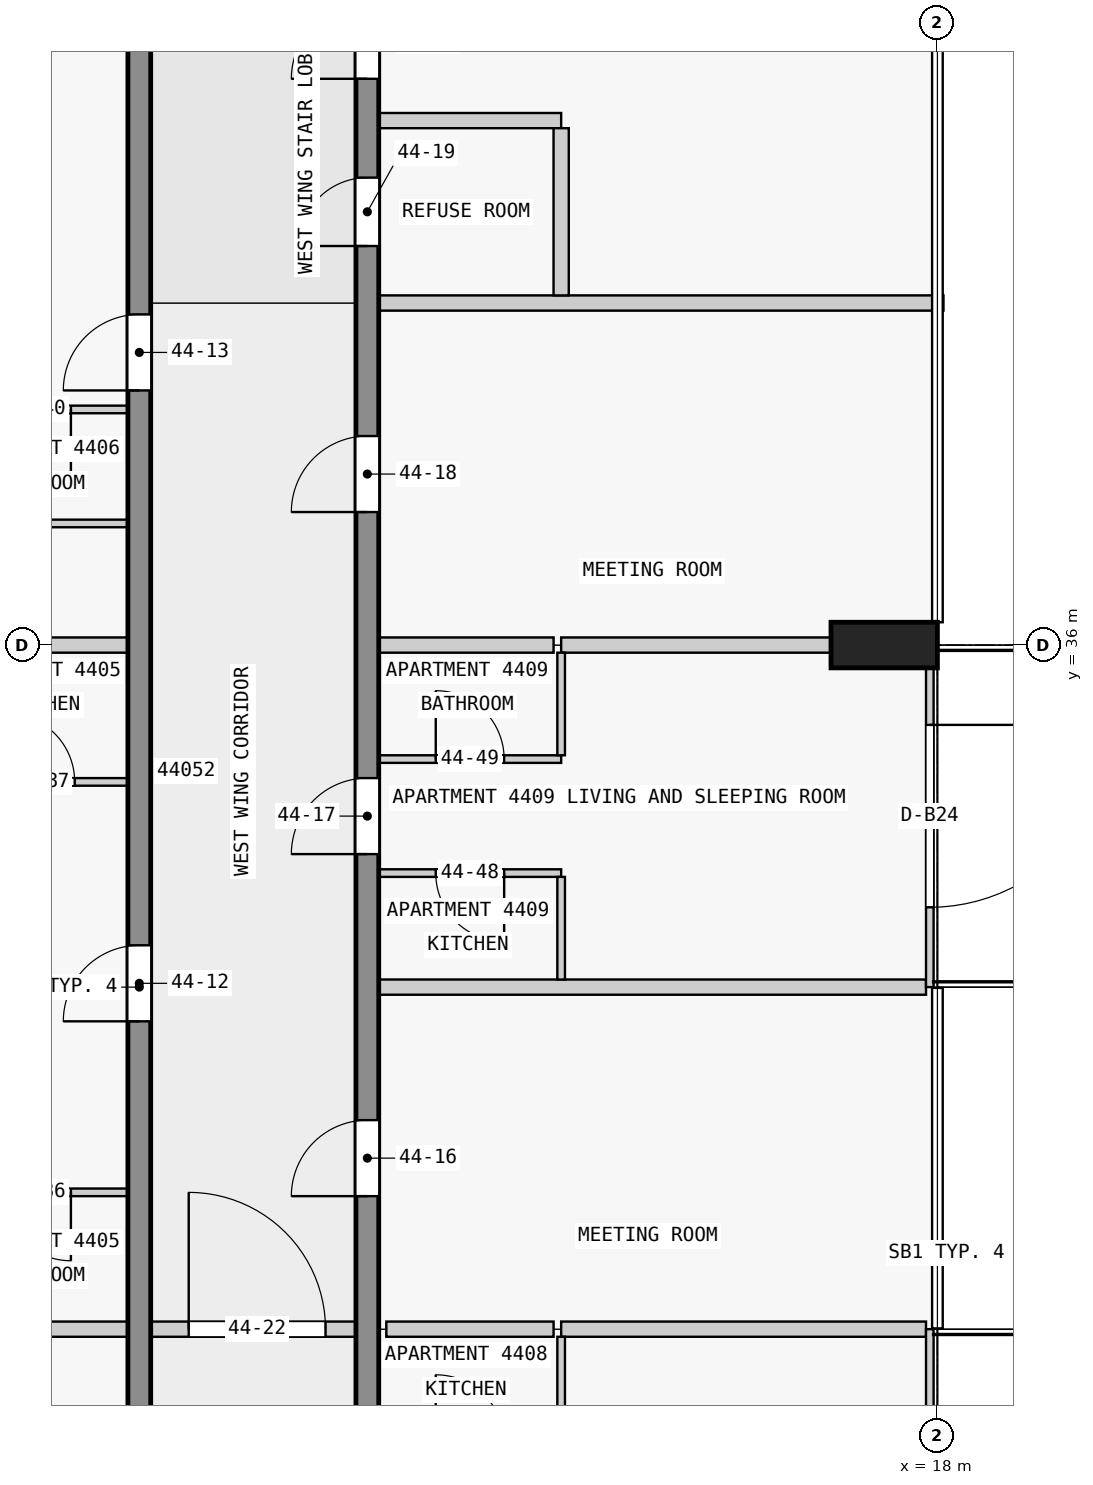
"""IFC4 building model, lengths in metres.
Left out: names, types, materials, properties, quantities, classifications, styles, units other than length and angle.
Written with IfcOpenShell. Run it as: python <this file> out.ifc"""

import sys

from ifc_helpers import new_model, si_unit, direction, frame, frame_2d, origin, origin_2d, place, context, subcontext, project, spatial, rectangle, extrude, element, fill, save


model = new_model("IFC4")
c1 = context("Model", 3, precision=1e-05, world=origin(), true_north=direction((0.0, 1.0)))
c2 = subcontext(c1, "Body", "Model", "MODEL_VIEW")
j1 = project(units=[si_unit("LENGTHUNIT", "METRE"), si_unit("PLANEANGLEUNIT", "RADIAN")], contexts=[c1])
p1 = place(None, origin())
s1 = spatial("IfcSite", under=j1, at=p1, CompositionType="ELEMENT")
p2 = place(p1, origin())
s2 = spatial("IfcBuilding", under=s1, at=p2, CompositionType="ELEMENT")
p3 = place(p2, frame((0.0, 0.0, 170.9)))
s3 = spatial("IfcBuildingStorey", under=s2, at=p3, CompositionType="ELEMENT", Elevation=170.9)
p4 = place(p3, frame((17.3, 36.0, 0.0), z_axis=(0.0, 0.0, 1.0), x_axis=(0.0, 1.0, 0.0)))
e1 = element("IfcColumn", 1, at=p4, inside=s3, PredefinedType="COLUMN", context=c2, shape_type="SweptSolid", body=[
    extrude(rectangle(XDim=0.6, YDim=1.4, at=origin_2d()), origin(), (0.0, 0.0, 1.0), 3.5),
])
p5 = place(p3, frame((7.5, 18.0, 0.0), z_axis=(0.0, 0.0, 1.0), x_axis=(0.0, 1.0, 0.0)))
e2 = element("IfcWall", 2, at=p5, inside=s3, PredefinedType="SHEAR", context=c2, shape_type="SweptSolid", body=[
    extrude(rectangle(XDim=27.0, YDim=0.3, at=frame_2d((13.5, 0.0))), origin(), (0.0, 0.0, 1.0), 3.25),
])
p6 = place(p5, frame((1.75, 0.0, 0.0)))
e3 = element("IfcOpeningElement", 3, at=p6, cuts=e2, PredefinedType="OPENING", context=c2, shape_type="SweptSolid", body=[
    extrude(rectangle(XDim=1.0, YDim=2.1, at=frame_2d((0.5, 1.05))), frame((0.0, 0.16, 0.0), z_axis=(0.0, -1.0, 0.0), x_axis=(1.0, 0.0, 0.0)), (0.0, 0.0, 1.0), 0.32),
])
p7 = place(p5, frame((5.85, 0.0, 0.0)))
e4 = element("IfcOpeningElement", 4, at=p7, cuts=e2, PredefinedType="OPENING", context=c2, shape_type="SweptSolid", body=[
    extrude(rectangle(XDim=1.8, YDim=2.1, at=frame_2d((0.9, 1.05))), frame((0.0, 0.16, 0.0), z_axis=(0.0, -1.0, 0.0), x_axis=(1.0, 0.0, 0.0)), (0.0, 0.0, 1.0), 0.32),
])
p8 = place(p5, frame((13.05, 0.0, 0.0)))
e5 = element("IfcOpeningElement", 5, at=p8, cuts=e2, PredefinedType="OPENING", context=c2, shape_type="SweptSolid", body=[
    extrude(rectangle(XDim=1.0, YDim=2.1, at=frame_2d((0.5, 1.05))), frame((0.0, 0.16, 0.0), z_axis=(0.0, -1.0, 0.0), x_axis=(1.0, 0.0, 0.0)), (0.0, 0.0, 1.0), 0.32),
])
p9 = place(p5, frame((21.35, 0.0, 0.0)))
e6 = element("IfcOpeningElement", 6, at=p9, cuts=e2, PredefinedType="OPENING", context=c2, shape_type="SweptSolid", body=[
    extrude(rectangle(XDim=1.0, YDim=2.1, at=frame_2d((0.5, 1.05))), frame((0.0, 0.16, 0.0), z_axis=(0.0, -1.0, 0.0), x_axis=(1.0, 0.0, 0.0)), (0.0, 0.0, 1.0), 0.32),
])
p10 = place(p3, frame((10.5, 18.0, 0.0), z_axis=(0.0, 0.0, 1.0), x_axis=(0.0, 1.0, 0.0)))
e7 = element("IfcWall", 7, at=p10, inside=s3, PredefinedType="SHEAR", context=c2, shape_type="SweptSolid", body=[
    extrude(rectangle(XDim=27.0, YDim=0.3, at=frame_2d((13.5, 0.0))), origin(), (0.0, 0.0, 1.0), 3.25),
])
p11 = place(p10, frame((1.75, 0.0, 0.0)))
e8 = element("IfcOpeningElement", 8, at=p11, cuts=e7, PredefinedType="OPENING", context=c2, shape_type="SweptSolid", body=[
    extrude(rectangle(XDim=1.0, YDim=2.1, at=frame_2d((0.5, 1.05))), frame((0.0, 0.16, 0.0), z_axis=(0.0, -1.0, 0.0), x_axis=(1.0, 0.0, 0.0)), (0.0, 0.0, 1.0), 0.32),
])
p12 = place(p10, frame((6.25, 0.0, 0.0)))
e9 = element("IfcOpeningElement", 9, at=p12, cuts=e7, PredefinedType="OPENING", context=c2, shape_type="SweptSolid", body=[
    extrude(rectangle(XDim=1.0, YDim=2.1, at=frame_2d((0.5, 1.05))), frame((0.0, 0.16, 0.0), z_axis=(0.0, -1.0, 0.0), x_axis=(1.0, 0.0, 0.0)), (0.0, 0.0, 1.0), 0.32),
])
p13 = place(p10, frame((10.75, 0.0, 0.0)))
e10 = element("IfcOpeningElement", 10, at=p13, cuts=e7, PredefinedType="OPENING", context=c2, shape_type="SweptSolid", body=[
    extrude(rectangle(XDim=1.0, YDim=2.1, at=frame_2d((0.5, 1.05))), frame((0.0, 0.16, 0.0), z_axis=(0.0, -1.0, 0.0), x_axis=(1.0, 0.0, 0.0)), (0.0, 0.0, 1.0), 0.32),
])
p14 = place(p10, frame((15.25, 0.0, 0.0)))
e11 = element("IfcOpeningElement", 11, at=p14, cuts=e7, PredefinedType="OPENING", context=c2, shape_type="SweptSolid", body=[
    extrude(rectangle(XDim=1.0, YDim=2.1, at=frame_2d((0.5, 1.05))), frame((0.0, 0.16, 0.0), z_axis=(0.0, -1.0, 0.0), x_axis=(1.0, 0.0, 0.0)), (0.0, 0.0, 1.0), 0.32),
])
p15 = place(p10, frame((19.75, 0.0, 0.0)))
e12 = element("IfcOpeningElement", 12, at=p15, cuts=e7, PredefinedType="OPENING", context=c2, shape_type="SweptSolid", body=[
    extrude(rectangle(XDim=1.0, YDim=2.1, at=frame_2d((0.5, 1.05))), frame((0.0, 0.16, 0.0), z_axis=(0.0, -1.0, 0.0), x_axis=(1.0, 0.0, 0.0)), (0.0, 0.0, 1.0), 0.32),
])
p16 = place(p10, frame((23.25, 0.0, 0.0)))
e13 = element("IfcOpeningElement", 13, at=p16, cuts=e7, PredefinedType="OPENING", context=c2, shape_type="SweptSolid", body=[
    extrude(rectangle(XDim=0.9, YDim=2.1, at=frame_2d((0.45, 1.05))), frame((0.0, 0.16, 0.0), z_axis=(0.0, -1.0, 0.0), x_axis=(1.0, 0.0, 0.0)), (0.0, 0.0, 1.0), 0.32),
])
p17 = place(p10, frame((25.45, 0.0, 0.0)))
e14 = element("IfcOpeningElement", 14, at=p17, cuts=e7, PredefinedType="OPENING", context=c2, shape_type="SweptSolid", body=[
    extrude(rectangle(XDim=1.0, YDim=2.1, at=frame_2d((0.5, 1.05))), frame((0.0, 0.16, 0.0), z_axis=(0.0, -1.0, 0.0), x_axis=(1.0, 0.0, 0.0)), (0.0, 0.0, 1.0), 0.32),
])
p18 = place(p3, frame((17.9, 27.0, 0.0), z_axis=(0.0, 0.0, 1.0), x_axis=(0.0, -1.0, 0.0)))
e15 = element("IfcWall", 15, at=p18, inside=s3, PredefinedType="STANDARD", context=c2, shape_type="SweptSolid", body=[
    extrude(rectangle(XDim=4.5, YDim=0.1, at=frame_2d((2.25, 0.0))), origin(), (0.0, 0.0, 1.0), 3.25),
])
p19 = place(p18, frame((1.05, 0.0, 0.0)))
e16 = element("IfcOpeningElement", 16, at=p19, cuts=e15, PredefinedType="OPENING", context=c2, shape_type="SweptSolid", body=[
    extrude(rectangle(XDim=2.4, YDim=2.4, at=frame_2d((1.2, 1.2))), frame((0.0, 0.06, 0.0), z_axis=(0.0, -1.0, 0.0), x_axis=(1.0, 0.0, 0.0)), (0.0, 0.0, 1.0), 0.12),
])
p20 = place(p3, frame((17.9, 36.0, 0.0), z_axis=(0.0, 0.0, 1.0), x_axis=(0.0, -1.0, 0.0)))
e17 = element("IfcWall", 17, at=p20, inside=s3, PredefinedType="STANDARD", context=c2, shape_type="SweptSolid", body=[
    extrude(rectangle(XDim=4.5, YDim=0.1, at=frame_2d((2.25, 0.0))), origin(), (0.0, 0.0, 1.0), 3.25),
])
p21 = place(p20, frame((1.05, 0.0, 0.0)))
e18 = element("IfcOpeningElement", 18, at=p21, cuts=e17, PredefinedType="OPENING", context=c2, shape_type="SweptSolid", body=[
    extrude(rectangle(XDim=2.4, YDim=2.4, at=frame_2d((1.2, 1.2))), frame((0.0, 0.06, 0.0), z_axis=(0.0, -1.0, 0.0), x_axis=(1.0, 0.0, 0.0)), (0.0, 0.0, 1.0), 0.12),
])
p22 = place(p3, frame((7.35, 27.0, 0.0), z_axis=(0.0, 0.0, 1.0), x_axis=(-1.0, 0.0, 0.0)))
e19 = element("IfcWall", 19, at=p22, inside=s3, PredefinedType="PARTITIONING", context=c2, shape_type="SweptSolid", body=[
    extrude(rectangle(XDim=7.43, YDim=0.2, at=frame_2d((3.715, 0.0))), origin(), (0.0, 0.0, 1.0), 3.25),
])
p23 = place(p3, frame((12.95, 27.0, 0.0), z_axis=(0.0, 0.0, 1.0), x_axis=(-1.0, 0.0, 0.0)))
e20 = element("IfcWall", 20, at=p23, inside=s3, PredefinedType="PARTITIONING", context=c2, shape_type="SweptSolid", body=[
    extrude(rectangle(XDim=2.2, YDim=0.2, at=frame_2d((1.1, 0.0))), origin(), (0.0, 0.0, 1.0), 3.25),
])
p24 = place(p3, frame((13.05, 27.0, 0.0), z_axis=(0.0, 0.0, 1.0), x_axis=(1.0, 0.0, 0.0)))
e21 = element("IfcWall", 21, at=p24, inside=s3, PredefinedType="PARTITIONING", context=c2, shape_type="SweptSolid", body=[
    extrude(rectangle(XDim=4.8, YDim=0.2, at=frame_2d((2.4, 0.0))), origin(), (0.0, 0.0, 1.0), 3.25),
])
p25 = place(p3, frame((7.35, 28.8, 0.0), z_axis=(0.0, 0.0, 1.0), x_axis=(-1.0, 0.0, 0.0)))
e22 = element("IfcWall", 22, at=p25, inside=s3, PredefinedType="PARTITIONING", context=c2, shape_type="SweptSolid", body=[
    extrude(rectangle(XDim=2.35, YDim=0.1, at=frame_2d((1.175, 0.0))), origin(), (0.0, 0.0, 1.0), 3.25),
])
p26 = place(p25, frame((0.75, 0.0, 0.0)))
e23 = element("IfcOpeningElement", 23, at=p26, cuts=e22, PredefinedType="OPENING", context=c2, shape_type="SweptSolid", body=[
    extrude(rectangle(XDim=0.9, YDim=2.1, at=frame_2d((0.45, 1.05))), frame((0.0, 0.06, 0.0), z_axis=(0.0, -1.0, 0.0), x_axis=(1.0, 0.0, 0.0)), (0.0, 0.0, 1.0), 0.12),
])
p27 = place(p3, frame((17.85, 31.5, 0.0), z_axis=(0.0, 0.0, 1.0), x_axis=(-1.0, 0.0, 0.0)))
e24 = element("IfcWall", 24, at=p27, inside=s3, PredefinedType="PARTITIONING", context=c2, shape_type="SweptSolid", body=[
    extrude(rectangle(XDim=7.2, YDim=0.2, at=frame_2d((3.6, 0.0))), origin(), (0.0, 0.0, 1.0), 3.25),
])
p28 = place(p3, frame((13.05, 33.0, 0.0), z_axis=(0.0, 0.0, 1.0), x_axis=(-1.0, 0.0, 0.0)))
e25 = element("IfcWall", 25, at=p28, inside=s3, PredefinedType="PARTITIONING", context=c2, shape_type="SweptSolid", body=[
    extrude(rectangle(XDim=2.4, YDim=0.1, at=frame_2d((1.2, 0.0))), origin(), (0.0, 0.0, 1.0), 3.25),
])
p29 = place(p28, frame((0.75, 0.0, 0.0)))
e26 = element("IfcOpeningElement", 26, at=p29, cuts=e25, PredefinedType="OPENING", context=c2, shape_type="SweptSolid", body=[
    extrude(rectangle(XDim=0.9, YDim=2.1, at=frame_2d((0.45, 1.05))), frame((0.0, 0.06, 0.0), z_axis=(0.0, -1.0, 0.0), x_axis=(1.0, 0.0, 0.0)), (0.0, 0.0, 1.0), 0.12),
])
p30 = place(p3, frame((5.0, 34.2, 0.0), z_axis=(0.0, 0.0, 1.0), x_axis=(1.0, 0.0, 0.0)))
e27 = element("IfcWall", 27, at=p30, inside=s3, PredefinedType="PARTITIONING", context=c2, shape_type="SweptSolid", body=[
    extrude(rectangle(XDim=2.35, YDim=0.1, at=frame_2d((1.175, 0.0))), origin(), (0.0, 0.0, 1.0), 3.25),
])
p31 = place(p30, frame((0.75, 0.0, 0.0)))
e28 = element("IfcOpeningElement", 28, at=p31, cuts=e27, PredefinedType="OPENING", context=c2, shape_type="SweptSolid", body=[
    extrude(rectangle(XDim=0.9, YDim=2.1, at=frame_2d((0.45, 1.05))), frame((0.0, 0.06, 0.0), z_axis=(0.0, -1.0, 0.0), x_axis=(1.0, 0.0, 0.0)), (0.0, 0.0, 1.0), 0.12),
])
p32 = place(p3, frame((10.65, 34.5, 0.0), z_axis=(0.0, 0.0, 1.0), x_axis=(1.0, 0.0, 0.0)))
e29 = element("IfcWall", 29, at=p32, inside=s3, PredefinedType="PARTITIONING", context=c2, shape_type="SweptSolid", body=[
    extrude(rectangle(XDim=2.4, YDim=0.1, at=frame_2d((1.2, 0.0))), origin(), (0.0, 0.0, 1.0), 3.25),
])
p33 = place(p32, frame((0.75, 0.0, 0.0)))
e30 = element("IfcOpeningElement", 30, at=p33, cuts=e29, PredefinedType="OPENING", context=c2, shape_type="SweptSolid", body=[
    extrude(rectangle(XDim=0.9, YDim=2.1, at=frame_2d((0.45, 1.05))), frame((0.0, 0.06, 0.0), z_axis=(0.0, -1.0, 0.0), x_axis=(1.0, 0.0, 0.0)), (0.0, 0.0, 1.0), 0.12),
])
for number, where, z_axis, x_axis in (
    (31, (7.35, 36.0, 0.0), (0.0, 0.0, 1.0), (-1.0, 0.0, 0.0)),
    (32, (12.95, 36.0, 0.0), (0.0, 0.0, 1.0), (-1.0, 0.0, 0.0)),
):
    element("IfcWall", number, at=place(p3, frame(where, z_axis=z_axis, x_axis=x_axis)), inside=s3, PredefinedType="PARTITIONING", context=c2, shape_type="SweptSolid", body=[
        extrude(rectangle(XDim=2.3, YDim=0.2, at=frame_2d((1.15, 0.0))), origin(), (0.0, 0.0, 1.0), 3.25),
    ])
p34 = place(p3, frame((13.05, 36.0, 0.0), z_axis=(0.0, 0.0, 1.0), x_axis=(1.0, 0.0, 0.0)))
e33 = element("IfcWall", 33, at=p34, inside=s3, PredefinedType="PARTITIONING", context=c2, shape_type="SweptSolid", body=[
    extrude(rectangle(XDim=3.55, YDim=0.2, at=frame_2d((1.775, 0.0))), origin(), (0.0, 0.0, 1.0), 3.25),
])
p35 = place(p3, frame((7.35, 37.6, 0.0), z_axis=(0.0, 0.0, 1.0), x_axis=(-1.0, 0.0, 0.0)))
e34 = element("IfcWall", 34, at=p35, inside=s3, PredefinedType="PARTITIONING", context=c2, shape_type="SweptSolid", body=[
    extrude(rectangle(XDim=2.35, YDim=0.1, at=frame_2d((1.175, 0.0))), origin(), (0.0, 0.0, 1.0), 3.25),
])
p36 = place(p3, frame((7.35, 39.1, 0.0), z_axis=(0.0, 0.0, 1.0), x_axis=(-1.0, 0.0, 0.0)))
e35 = element("IfcWall", 35, at=p36, inside=s3, PredefinedType="PARTITIONING", context=c2, shape_type="SweptSolid", body=[
    extrude(rectangle(XDim=2.35, YDim=0.1, at=frame_2d((1.175, 0.0))), origin(), (0.0, 0.0, 1.0), 3.25),
])
p37 = place(p36, frame((0.75, 0.0, 0.0)))
e36 = element("IfcOpeningElement", 36, at=p37, cuts=e35, PredefinedType="OPENING", context=c2, shape_type="SweptSolid", body=[
    extrude(rectangle(XDim=0.9, YDim=2.1, at=frame_2d((0.45, 1.05))), frame((0.0, 0.06, 0.0), z_axis=(0.0, -1.0, 0.0), x_axis=(1.0, 0.0, 0.0)), (0.0, 0.0, 1.0), 0.12),
])
p38 = place(p3, frame((18.08, 40.5, 0.0), z_axis=(0.0, 0.0, 1.0), x_axis=(-1.0, 0.0, 0.0)))
e37 = element("IfcWall", 37, at=p38, inside=s3, PredefinedType="PARTITIONING", context=c2, shape_type="SweptSolid", body=[
    extrude(rectangle(XDim=7.43, YDim=0.2, at=frame_2d((3.715, 0.0))), origin(), (0.0, 0.0, 1.0), 3.25),
])
p39 = place(p3, frame((13.05, 42.9, 0.0), z_axis=(0.0, 0.0, 1.0), x_axis=(-1.0, 0.0, 0.0)))
e38 = element("IfcWall", 38, at=p39, inside=s3, PredefinedType="PARTITIONING", context=c2, shape_type="SweptSolid", body=[
    extrude(rectangle(XDim=2.4, YDim=0.2, at=frame_2d((1.2, 0.0))), origin(), (0.0, 0.0, 1.0), 3.25),
])
for number, where, z_axis, x_axis in (
    (39, (13.05, 25.55, 0.0), (0.0, 0.0, 1.0), (0.0, 1.0, 0.0)),
    (40, (13.05, 31.6, 0.0), (0.0, 0.0, 1.0), (0.0, 1.0, 0.0)),
    (41, (13.05, 34.55, 0.0), (0.0, 0.0, 1.0), (0.0, 1.0, 0.0)),
):
    element("IfcWall", number, at=place(p3, frame(where, z_axis=z_axis, x_axis=x_axis)), inside=s3, PredefinedType="PARTITIONING", context=c2, shape_type="SweptSolid", body=[
        extrude(rectangle(XDim=1.35, YDim=0.1, at=frame_2d((0.675, 0.0))), origin(), (0.0, 0.0, 1.0), 3.25),
    ])
p40 = place(p3, frame((13.05, 40.6, 0.0), z_axis=(0.0, 0.0, 1.0), x_axis=(0.0, 1.0, 0.0)))
e42 = element("IfcWall", 42, at=p40, inside=s3, PredefinedType="PARTITIONING", context=c2, shape_type="SweptSolid", body=[
    extrude(rectangle(XDim=2.2, YDim=0.2, at=frame_2d((1.1, 0.0))), origin(), (0.0, 0.0, 1.0), 3.25),
])
p41 = place(p3, frame((7.45, 27.0, 0.0), z_axis=(0.0, 0.0, 1.0), x_axis=(1.0, 0.0, 0.0)))
e43 = element("IfcWall", 43, at=p41, inside=s3, PredefinedType="PARTITIONING", context=c2, shape_type="SweptSolid", body=[
    extrude(rectangle(XDim=3.2, YDim=0.2, at=frame_2d((1.6, 0.0))), origin(), (0.0, 0.0, 1.0), 3.25),
])
p42 = place(p41, frame((0.7, 0.0, 0.0)))
e44 = element("IfcOpeningElement", 44, at=p42, cuts=e43, PredefinedType="OPENING", context=c2, shape_type="SweptSolid", body=[
    extrude(rectangle(XDim=1.8, YDim=2.1, at=frame_2d((0.9, 1.05))), frame((0.0, 0.11, 0.0), z_axis=(0.0, -1.0, 0.0), x_axis=(1.0, 0.0, 0.0)), (0.0, 0.0, 1.0), 0.22),
])
p43 = place(p21, origin())
e45 = element("IfcDoor", 45, at=p43, inside=s3, OperationType="SINGLE_SWING_LEFT", PredefinedType="DOOR", context=c2, shape_type="SweptSolid", body=[
    extrude(rectangle(XDim=2.4, YDim=2.4, at=frame_2d((1.2, 1.2))), frame((0.0, 0.025, 0.0), z_axis=(0.0, -1.0, 0.0), x_axis=(1.0, 0.0, 0.0)), (0.0, 0.0, 1.0), 0.05),
])
fill(e18, e45)
p44 = place(p8, origin())
e46 = element("IfcDoor", 46, at=p44, inside=s3, OperationType="SINGLE_SWING_RIGHT", PredefinedType="DOOR", context=c2, shape_type="SweptSolid", body=[
    extrude(rectangle(XDim=1.0, YDim=2.1, at=frame_2d((0.5, 1.05))), frame((0.0, 0.025, 0.0), z_axis=(0.0, -1.0, 0.0), x_axis=(1.0, 0.0, 0.0)), (0.0, 0.0, 1.0), 0.05),
])
fill(e5, e46)
p45 = place(p9, origin())
e47 = element("IfcDoor", 47, at=p45, inside=s3, OperationType="SINGLE_SWING_RIGHT", PredefinedType="DOOR", context=c2, shape_type="SweptSolid", body=[
    extrude(rectangle(XDim=1.0, YDim=2.1, at=frame_2d((0.5, 1.05))), frame((0.0, 0.025, 0.0), z_axis=(0.0, -1.0, 0.0), x_axis=(1.0, 0.0, 0.0)), (0.0, 0.0, 1.0), 0.05),
])
fill(e6, e47)
p46 = place(p13, origin())
e48 = element("IfcDoor", 48, at=p46, inside=s3, OperationType="SINGLE_SWING_LEFT", PredefinedType="DOOR", context=c2, shape_type="SweptSolid", body=[
    extrude(rectangle(XDim=1.0, YDim=2.1, at=frame_2d((0.5, 1.05))), frame((0.0, 0.025, 0.0), z_axis=(0.0, -1.0, 0.0), x_axis=(1.0, 0.0, 0.0)), (0.0, 0.0, 1.0), 0.05),
])
fill(e10, e48)
p47 = place(p14, origin())
e49 = element("IfcDoor", 49, at=p47, inside=s3, OperationType="SINGLE_SWING_RIGHT", PredefinedType="DOOR", context=c2, shape_type="SweptSolid", body=[
    extrude(rectangle(XDim=1.0, YDim=2.1, at=frame_2d((0.5, 1.05))), frame((0.0, 0.025, 0.0), z_axis=(0.0, -1.0, 0.0), x_axis=(1.0, 0.0, 0.0)), (0.0, 0.0, 1.0), 0.05),
])
fill(e11, e49)
p48 = place(p15, origin())
e50 = element("IfcDoor", 50, at=p48, inside=s3, OperationType="SINGLE_SWING_RIGHT", PredefinedType="DOOR", context=c2, shape_type="SweptSolid", body=[
    extrude(rectangle(XDim=1.0, YDim=2.1, at=frame_2d((0.5, 1.05))), frame((0.0, 0.025, 0.0), z_axis=(0.0, -1.0, 0.0), x_axis=(1.0, 0.0, 0.0)), (0.0, 0.0, 1.0), 0.05),
])
fill(e12, e50)
p49 = place(p16, origin())
e51 = element("IfcDoor", 51, at=p49, inside=s3, OperationType="SINGLE_SWING_RIGHT", PredefinedType="DOOR", context=c2, shape_type="SweptSolid", body=[
    extrude(rectangle(XDim=0.9, YDim=2.1, at=frame_2d((0.45, 1.05))), frame((0.0, 0.025, 0.0), z_axis=(0.0, -1.0, 0.0), x_axis=(1.0, 0.0, 0.0)), (0.0, 0.0, 1.0), 0.05),
])
fill(e13, e51)
p50 = place(p17, origin())
e52 = element("IfcDoor", 52, at=p50, inside=s3, OperationType="SINGLE_SWING_RIGHT", PredefinedType="DOOR", context=c2, shape_type="SweptSolid", body=[
    extrude(rectangle(XDim=1.0, YDim=2.1, at=frame_2d((0.5, 1.05))), frame((0.0, 0.025, 0.0), z_axis=(0.0, -1.0, 0.0), x_axis=(1.0, 0.0, 0.0)), (0.0, 0.0, 1.0), 0.05),
])
fill(e14, e52)
p51 = place(p42, origin())
e53 = element("IfcDoor", 53, at=p51, inside=s3, OperationType="SINGLE_SWING_LEFT", PredefinedType="DOOR", context=c2, shape_type="SweptSolid", body=[
    extrude(rectangle(XDim=1.8, YDim=2.1, at=frame_2d((0.9, 1.05))), frame((0.0, 0.025, 0.0), z_axis=(0.0, -1.0, 0.0), x_axis=(1.0, 0.0, 0.0)), (0.0, 0.0, 1.0), 0.05),
])
fill(e44, e53)
p52 = place(p26, origin())
e54 = element("IfcDoor", 54, at=p52, inside=s3, OperationType="SINGLE_SWING_RIGHT", PredefinedType="DOOR", context=c2, shape_type="SweptSolid", body=[
    extrude(rectangle(XDim=0.9, YDim=2.1, at=frame_2d((0.45, 1.05))), frame((0.0, 0.025, 0.0), z_axis=(0.0, -1.0, 0.0), x_axis=(1.0, 0.0, 0.0)), (0.0, 0.0, 1.0), 0.05),
])
fill(e23, e54)
p53 = place(p31, origin())
e55 = element("IfcDoor", 55, at=p53, inside=s3, OperationType="SINGLE_SWING_RIGHT", PredefinedType="DOOR", context=c2, shape_type="SweptSolid", body=[
    extrude(rectangle(XDim=0.9, YDim=2.1, at=frame_2d((0.45, 1.05))), frame((0.0, 0.025, 0.0), z_axis=(0.0, -1.0, 0.0), x_axis=(1.0, 0.0, 0.0)), (0.0, 0.0, 1.0), 0.05),
])
fill(e28, e55)
p54 = place(p37, origin())
e56 = element("IfcDoor", 56, at=p54, inside=s3, OperationType="SINGLE_SWING_RIGHT", PredefinedType="DOOR", context=c2, shape_type="SweptSolid", body=[
    extrude(rectangle(XDim=0.9, YDim=2.1, at=frame_2d((0.45, 1.05))), frame((0.0, 0.025, 0.0), z_axis=(0.0, -1.0, 0.0), x_axis=(1.0, 0.0, 0.0)), (0.0, 0.0, 1.0), 0.05),
])
fill(e36, e56)
p55 = place(p29, origin())
e57 = element("IfcDoor", 57, at=p55, inside=s3, OperationType="SINGLE_SWING_LEFT", PredefinedType="DOOR", context=c2, shape_type="SweptSolid", body=[
    extrude(rectangle(XDim=0.9, YDim=2.1, at=frame_2d((0.45, 1.05))), frame((0.0, 0.025, 0.0), z_axis=(0.0, -1.0, 0.0), x_axis=(1.0, 0.0, 0.0)), (0.0, 0.0, 1.0), 0.05),
])
fill(e26, e57)
p56 = place(p33, origin())
e58 = element("IfcDoor", 58, at=p56, inside=s3, OperationType="SINGLE_SWING_LEFT", PredefinedType="DOOR", context=c2, shape_type="SweptSolid", body=[
    extrude(rectangle(XDim=0.9, YDim=2.1, at=frame_2d((0.45, 1.05))), frame((0.0, 0.025, 0.0), z_axis=(0.0, -1.0, 0.0), x_axis=(1.0, 0.0, 0.0)), (0.0, 0.0, 1.0), 0.05),
])
fill(e30, e58)
save(model, sys.argv[1])
